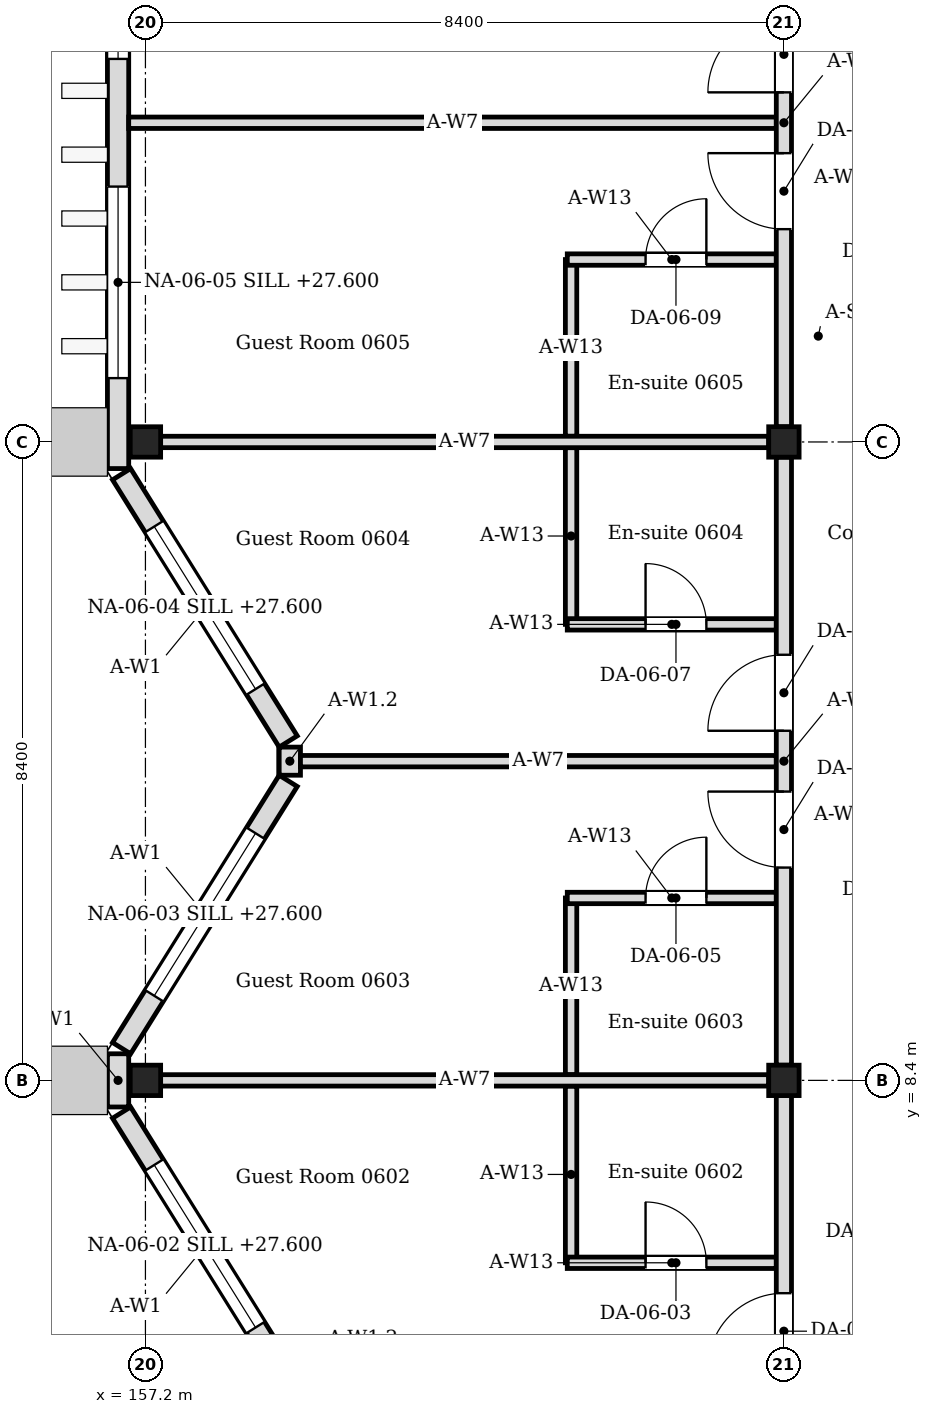
"""IFC4 building model, lengths in metres.
Left out: names, types, materials, properties, quantities, classifications, styles, units other than length and angle.
Written with IfcOpenShell. Run it as: python <this file> out.ifc"""

import sys

from ifc_helpers import new_model, si_unit, direction, frame, frame_2d, origin, origin_2d, place, context, subcontext, project, spatial, rectangle, i_section, extrude, element, fill, save


model = new_model("IFC4")
c1 = context("Model", 3, precision=1e-05, world=origin(), true_north=direction((0.0, 1.0)))
c2 = subcontext(c1, "Body", "Model", "MODEL_VIEW")
j1 = project(units=[si_unit("LENGTHUNIT", "METRE"), si_unit("PLANEANGLEUNIT", "RADIAN")], contexts=[c1])
p1 = place(None, origin())
s1 = spatial("IfcSite", under=j1, at=p1, CompositionType="ELEMENT")
p2 = place(p1, origin())
s2 = spatial("IfcBuilding", under=s1, at=p2, CompositionType="ELEMENT")
p3 = place(p2, frame((0.0, 0.0, 27.0)))
s3 = spatial("IfcBuildingStorey", under=s2, at=p3, CompositionType="ELEMENT", Elevation=27.0)
for number, where, z_axis, x_axis in (
    (1, (157.2, 8.4, 0.0), (0.0, 0.0, 1.0), (1.0, 0.0, 0.0)),
    (2, (157.2, 16.8, 0.0), (0.0, 0.0, 1.0), (1.0, 0.0, 0.0)),
    (3, (165.6, 8.4, 0.0), (0.0, 0.0, 1.0), (1.0, 0.0, 0.0)),
    (4, (165.6, 16.8, 0.0), (0.0, 0.0, 1.0), (1.0, 0.0, 0.0)),
):
    element("IfcColumn", number, at=place(p3, frame(where, z_axis=z_axis, x_axis=x_axis)), inside=s3, PredefinedType="COLUMN", context=c2, shape_type="SweptSolid", body=[
        extrude(i_section(OverallWidth=0.4, OverallDepth=0.4, WebThickness=0.013, FlangeThickness=0.021, FilletRadius=0.022, at=origin_2d()), origin(), (0.0, 0.0, 1.0), 4.2),
    ])
p4 = place(p3, frame((159.079, 4.459, 0.0), z_axis=(0.0, 0.0, 1.0), x_axis=(-0.529018946142, 0.848610013271, 0.0)))
e5 = element("IfcWall", 5, at=p4, inside=s3, PredefinedType="SOLIDWALL", context=c2, shape_type="SweptSolid", body=[
    extrude(rectangle(XDim=4.144, YDim=0.28, at=frame_2d((2.072, 0.0))), origin(), (0.0, 0.0, 1.0), 4.05),
])
p5 = place(p4, frame((0.812, 0.0, 0.6)))
e6 = element("IfcOpeningElement", 6, at=p5, cuts=e5, PredefinedType="OPENING", context=c2, shape_type="SweptSolid", body=[
    extrude(rectangle(XDim=2.52, YDim=2.4, at=frame_2d((1.26, 1.2))), frame((0.0, 0.15, 0.0), z_axis=(0.0, -1.0, 0.0), x_axis=(1.0, 0.0, 0.0)), (0.0, 0.0, 1.0), 0.3),
])
p6 = place(p3, frame((156.84, 8.05, 0.0), z_axis=(0.0, 0.0, 1.0), x_axis=(0.0, 1.0, 0.0)))
e7 = element("IfcWall", 7, at=p6, inside=s3, PredefinedType="SOLIDWALL", context=c2, shape_type="SweptSolid", body=[
    extrude(rectangle(XDim=0.7, YDim=0.28, at=frame_2d((0.35, 0.0))), origin(), (0.0, 0.0, 1.0), 4.05),
])
p7 = place(p3, frame((156.886, 8.824, 0.0), z_axis=(0.0, 0.0, 1.0), x_axis=(0.529018946142, 0.848610013271, 0.0)))
e8 = element("IfcWall", 8, at=p7, inside=s3, PredefinedType="SOLIDWALL", context=c2, shape_type="SweptSolid", body=[
    extrude(rectangle(XDim=4.144, YDim=0.28, at=frame_2d((2.072, 0.0))), origin(), (0.0, 0.0, 1.0), 4.05),
])
p8 = place(p7, frame((0.812, 0.0, 0.6)))
e9 = element("IfcOpeningElement", 9, at=p8, cuts=e8, PredefinedType="OPENING", context=c2, shape_type="SweptSolid", body=[
    extrude(rectangle(XDim=2.52, YDim=2.4, at=frame_2d((1.26, 1.2))), frame((0.0, 0.15, 0.0), z_axis=(0.0, -1.0, 0.0), x_axis=(1.0, 0.0, 0.0)), (0.0, 0.0, 1.0), 0.3),
])
p9 = place(p3, frame((159.079, 12.859, 0.0), z_axis=(0.0, 0.0, 1.0), x_axis=(-0.528992500338, 0.848626498871, 0.0)))
e10 = element("IfcWall", 10, at=p9, inside=s3, PredefinedType="SOLIDWALL", context=c2, shape_type="SweptSolid", body=[
    extrude(rectangle(XDim=4.145, YDim=0.28, at=frame_2d((2.072, 0.0))), origin(), (0.0, 0.0, 1.0), 4.05),
])
p10 = place(p9, frame((0.812, 0.0, 0.6)))
e11 = element("IfcOpeningElement", 11, at=p10, cuts=e10, PredefinedType="OPENING", context=c2, shape_type="SweptSolid", body=[
    extrude(rectangle(XDim=2.52, YDim=2.4, at=frame_2d((1.26, 1.2))), frame((0.0, 0.15, 0.0), z_axis=(0.0, -1.0, 0.0), x_axis=(1.0, 0.0, 0.0)), (0.0, 0.0, 1.0), 0.3),
])
p11 = place(p3, frame((159.1, 12.415, 0.0), z_axis=(0.0, 0.0, 1.0), x_axis=(0.0, 1.0, 0.0)))
e12 = element("IfcWall", 12, at=p11, inside=s3, PredefinedType="SOLIDWALL", context=c2, shape_type="SweptSolid", body=[
    extrude(rectangle(XDim=0.37, YDim=0.28, at=frame_2d((0.185, 0.0))), origin(), (0.0, 0.0, 1.0), 3.604),
])
p12 = place(p3, frame((156.84, 16.45, 0.0), z_axis=(0.0, 0.0, 1.0), x_axis=(0.0, 1.0, 0.0)))
e13 = element("IfcWall", 13, at=p12, inside=s3, PredefinedType="SOLIDWALL", context=c2, shape_type="SweptSolid", body=[
    extrude(rectangle(XDim=25.9, YDim=0.28, at=frame_2d((12.95, 0.0))), origin(), (0.0, 0.0, 1.0), 4.05),
])
p13 = place(p12, frame((1.19, 0.0, 0.6)))
e14 = element("IfcOpeningElement", 14, at=p13, cuts=e13, PredefinedType="OPENING", context=c2, shape_type="SweptSolid", body=[
    extrude(rectangle(XDim=2.52, YDim=2.4, at=frame_2d((1.26, 1.2))), frame((0.0, 0.15, 0.0), z_axis=(0.0, -1.0, 0.0), x_axis=(1.0, 0.0, 0.0)), (0.0, 0.0, 1.0), 0.3),
])
p14 = place(p12, frame((5.39, 0.0, 0.6)))
e15 = element("IfcOpeningElement", 15, at=p14, cuts=e13, PredefinedType="OPENING", context=c2, shape_type="SweptSolid", body=[
    extrude(rectangle(XDim=2.52, YDim=2.4, at=frame_2d((1.26, 1.2))), frame((0.0, 0.15, 0.0), z_axis=(0.0, -1.0, 0.0), x_axis=(1.0, 0.0, 0.0)), (0.0, 0.0, 1.0), 0.3),
])
p15 = place(p12, frame((10.01, 0.0, 0.6)))
e16 = element("IfcOpeningElement", 16, at=p15, cuts=e13, PredefinedType="OPENING", context=c2, shape_type="SweptSolid", body=[
    extrude(rectangle(XDim=2.52, YDim=2.4, at=frame_2d((1.26, 1.2))), frame((0.0, 0.15, 0.0), z_axis=(0.0, -1.0, 0.0), x_axis=(1.0, 0.0, 0.0)), (0.0, 0.0, 1.0), 0.3),
])
p16 = place(p12, frame((14.21, 0.0, 0.6)))
e17 = element("IfcOpeningElement", 17, at=p16, cuts=e13, PredefinedType="OPENING", context=c2, shape_type="SweptSolid", body=[
    extrude(rectangle(XDim=2.52, YDim=2.4, at=frame_2d((1.26, 1.2))), frame((0.0, 0.15, 0.0), z_axis=(0.0, -1.0, 0.0), x_axis=(1.0, 0.0, 0.0)), (0.0, 0.0, 1.0), 0.3),
])
p17 = place(p12, frame((17.99, 0.0, 0.6)))
e18 = element("IfcOpeningElement", 18, at=p17, cuts=e13, PredefinedType="OPENING", context=c2, shape_type="SweptSolid", body=[
    extrude(rectangle(XDim=2.52, YDim=2.4, at=frame_2d((1.26, 1.2))), frame((0.0, 0.15, 0.0), z_axis=(0.0, -1.0, 0.0), x_axis=(1.0, 0.0, 0.0)), (0.0, 0.0, 1.0), 0.3),
])
p18 = place(p12, frame((22.19, 0.0, 0.6)))
e19 = element("IfcOpeningElement", 19, at=p18, cuts=e13, PredefinedType="OPENING", context=c2, shape_type="SweptSolid", body=[
    extrude(rectangle(XDim=2.52, YDim=2.4, at=frame_2d((1.26, 1.2))), frame((0.0, 0.15, 0.0), z_axis=(0.0, -1.0, 0.0), x_axis=(1.0, 0.0, 0.0)), (0.0, 0.0, 1.0), 0.3),
])
p19 = place(p3, frame((162.8, 6.0, 0.0), z_axis=(0.0, 0.0, 1.0), x_axis=(0.0, 1.0, 0.0)))
e20 = element("IfcWall", 20, at=p19, inside=s3, PredefinedType="PARTITIONING", context=c2, shape_type="SweptSolid", body=[
    extrude(rectangle(XDim=2.325, YDim=0.15, at=frame_2d((1.163, 0.0))), origin(), (0.0, 0.0, 1.0), 4.05),
])
p20 = place(p3, frame((162.75, 6.0, 0.0), z_axis=(0.0, 0.0, 1.0), x_axis=(1.0, 0.0, 0.0)))
e21 = element("IfcWall", 21, at=p20, inside=s3, PredefinedType="PARTITIONING", context=c2, shape_type="SweptSolid", body=[
    extrude(rectangle(XDim=2.75, YDim=0.15, at=frame_2d((1.375, 0.0))), origin(), (0.0, 0.0, 1.0), 4.05),
])
p21 = place(p20, frame((1.03, 0.0, 0.0)))
e22 = element("IfcOpeningElement", 22, at=p21, cuts=e21, PredefinedType="OPENING", context=c2, shape_type="SweptSolid", body=[
    extrude(rectangle(XDim=0.8, YDim=2.1, at=frame_2d((0.4, 1.05))), frame((0.0, 0.085, 0.0), z_axis=(0.0, -1.0, 0.0), x_axis=(1.0, 0.0, 0.0)), (0.0, 0.0, 1.0), 0.17),
])
p22 = place(p3, frame((162.8, 8.475, 0.0), z_axis=(0.0, 0.0, 1.0), x_axis=(0.0, 1.0, 0.0)))
e23 = element("IfcWall", 23, at=p22, inside=s3, PredefinedType="PARTITIONING", context=c2, shape_type="SweptSolid", body=[
    extrude(rectangle(XDim=2.325, YDim=0.15, at=frame_2d((1.163, 0.0))), origin(), (0.0, 0.0, 1.0), 4.05),
])
p23 = place(p3, frame((162.75, 10.8, 0.0), z_axis=(0.0, 0.0, 1.0), x_axis=(1.0, 0.0, 0.0)))
e24 = element("IfcWall", 24, at=p23, inside=s3, PredefinedType="PARTITIONING", context=c2, shape_type="SweptSolid", body=[
    extrude(rectangle(XDim=2.75, YDim=0.15, at=frame_2d((1.375, 0.0))), origin(), (0.0, 0.0, 1.0), 4.05),
])
p24 = place(p23, frame((1.03, 0.0, 0.0)))
e25 = element("IfcOpeningElement", 25, at=p24, cuts=e24, PredefinedType="OPENING", context=c2, shape_type="SweptSolid", body=[
    extrude(rectangle(XDim=0.8, YDim=2.1, at=frame_2d((0.4, 1.05))), frame((0.0, 0.085, 0.0), z_axis=(0.0, -1.0, 0.0), x_axis=(1.0, 0.0, 0.0)), (0.0, 0.0, 1.0), 0.17),
])
p25 = place(p3, frame((162.8, 14.4, 0.0), z_axis=(0.0, 0.0, 1.0), x_axis=(0.0, 1.0, 0.0)))
e26 = element("IfcWall", 26, at=p25, inside=s3, PredefinedType="PARTITIONING", context=c2, shape_type="SweptSolid", body=[
    extrude(rectangle(XDim=2.325, YDim=0.15, at=frame_2d((1.163, 0.0))), origin(), (0.0, 0.0, 1.0), 4.05),
])
p26 = place(p3, frame((162.75, 14.4, 0.0), z_axis=(0.0, 0.0, 1.0), x_axis=(1.0, 0.0, 0.0)))
e27 = element("IfcWall", 27, at=p26, inside=s3, PredefinedType="PARTITIONING", context=c2, shape_type="SweptSolid", body=[
    extrude(rectangle(XDim=2.75, YDim=0.15, at=frame_2d((1.375, 0.0))), origin(), (0.0, 0.0, 1.0), 4.05),
])
p27 = place(p26, frame((1.03, 0.0, 0.0)))
e28 = element("IfcOpeningElement", 28, at=p27, cuts=e27, PredefinedType="OPENING", context=c2, shape_type="SweptSolid", body=[
    extrude(rectangle(XDim=0.8, YDim=2.1, at=frame_2d((0.4, 1.05))), frame((0.0, 0.085, 0.0), z_axis=(0.0, -1.0, 0.0), x_axis=(1.0, 0.0, 0.0)), (0.0, 0.0, 1.0), 0.17),
])
p28 = place(p3, frame((162.8, 16.875, 0.0), z_axis=(0.0, 0.0, 1.0), x_axis=(0.0, 1.0, 0.0)))
e29 = element("IfcWall", 29, at=p28, inside=s3, PredefinedType="PARTITIONING", context=c2, shape_type="SweptSolid", body=[
    extrude(rectangle(XDim=2.325, YDim=0.15, at=frame_2d((1.163, 0.0))), origin(), (0.0, 0.0, 1.0), 4.05),
])
p29 = place(p3, frame((162.75, 19.2, 0.0), z_axis=(0.0, 0.0, 1.0), x_axis=(1.0, 0.0, 0.0)))
e30 = element("IfcWall", 30, at=p29, inside=s3, PredefinedType="PARTITIONING", context=c2, shape_type="SweptSolid", body=[
    extrude(rectangle(XDim=2.75, YDim=0.15, at=frame_2d((1.375, 0.0))), origin(), (0.0, 0.0, 1.0), 4.05),
])
p30 = place(p29, frame((1.03, 0.0, 0.0)))
e31 = element("IfcOpeningElement", 31, at=p30, cuts=e30, PredefinedType="OPENING", context=c2, shape_type="SweptSolid", body=[
    extrude(rectangle(XDim=0.8, YDim=2.1, at=frame_2d((0.4, 1.05))), frame((0.0, 0.085, 0.0), z_axis=(0.0, -1.0, 0.0), x_axis=(1.0, 0.0, 0.0)), (0.0, 0.0, 1.0), 0.17),
])
for number, where, z_axis, x_axis in (
    (32, (157.4, 8.4, 0.0), (0.0, 0.0, 1.0), (1.0, 0.0, 0.0)),
    (33, (157.4, 16.8, 0.0), (0.0, 0.0, 1.0), (1.0, 0.0, 0.0)),
):
    element("IfcWall", number, at=place(p3, frame(where, z_axis=z_axis, x_axis=x_axis)), inside=s3, PredefinedType="PARTITIONING", context=c2, shape_type="SweptSolid", body=[
        extrude(rectangle(XDim=8.0, YDim=0.15, at=frame_2d((4.0, 0.0))), origin(), (0.0, 0.0, 1.0), 3.604),
    ])
p31 = place(p3, frame((159.24, 12.6, 0.0), z_axis=(0.0, 0.0, 1.0), x_axis=(1.0, 0.0, 0.0)))
e34 = element("IfcWall", 34, at=p31, inside=s3, PredefinedType="PARTITIONING", context=c2, shape_type="SweptSolid", body=[
    extrude(rectangle(XDim=6.26, YDim=0.15, at=frame_2d((3.13, 0.0))), origin(), (0.0, 0.0, 1.0), 3.604),
])
p32 = place(p3, frame((156.98, 21.0, 0.0), z_axis=(0.0, 0.0, 1.0), x_axis=(1.0, 0.0, 0.0)))
e35 = element("IfcWall", 35, at=p32, inside=s3, PredefinedType="PARTITIONING", context=c2, shape_type="SweptSolid", body=[
    extrude(rectangle(XDim=8.52, YDim=0.15, at=frame_2d((4.26, 0.0))), origin(), (0.0, 0.0, 1.0), 3.604),
])
p33 = place(p3, frame((165.6, 0.2, 0.0), z_axis=(0.0, 0.0, 1.0), x_axis=(0.0, 1.0, 0.0)))
e36 = element("IfcWall", 36, at=p33, inside=s3, PredefinedType="PARTITIONING", context=c2, shape_type="SweptSolid", body=[
    extrude(rectangle(XDim=8.0, YDim=0.2, at=frame_2d((4.0, 0.0))), origin(), (0.0, 0.0, 1.0), 3.45),
])
p34 = place(p33, frame((2.6, 0.0, 0.0)))
e37 = element("IfcOpeningElement", 37, at=p34, cuts=e36, PredefinedType="OPENING", context=c2, shape_type="SweptSolid", body=[
    extrude(rectangle(XDim=1.0, YDim=2.4, at=frame_2d((0.5, 1.2))), frame((0.0, 0.11, 0.0), z_axis=(0.0, -1.0, 0.0), x_axis=(1.0, 0.0, 0.0)), (0.0, 0.0, 1.0), 0.22),
])
p35 = place(p33, frame((4.4, 0.0, 0.0)))
e38 = element("IfcOpeningElement", 38, at=p35, cuts=e36, PredefinedType="OPENING", context=c2, shape_type="SweptSolid", body=[
    extrude(rectangle(XDim=1.0, YDim=2.4, at=frame_2d((0.5, 1.2))), frame((0.0, 0.11, 0.0), z_axis=(0.0, -1.0, 0.0), x_axis=(1.0, 0.0, 0.0)), (0.0, 0.0, 1.0), 0.22),
])
p36 = place(p3, frame((165.6, 8.6, 0.0), z_axis=(0.0, 0.0, 1.0), x_axis=(0.0, 1.0, 0.0)))
e39 = element("IfcWall", 39, at=p36, inside=s3, PredefinedType="PARTITIONING", context=c2, shape_type="SweptSolid", body=[
    extrude(rectangle(XDim=8.0, YDim=0.2, at=frame_2d((4.0, 0.0))), origin(), (0.0, 0.0, 1.0), 3.45),
])
p37 = place(p36, frame((2.6, 0.0, 0.0)))
e40 = element("IfcOpeningElement", 40, at=p37, cuts=e39, PredefinedType="OPENING", context=c2, shape_type="SweptSolid", body=[
    extrude(rectangle(XDim=1.0, YDim=2.4, at=frame_2d((0.5, 1.2))), frame((0.0, 0.11, 0.0), z_axis=(0.0, -1.0, 0.0), x_axis=(1.0, 0.0, 0.0)), (0.0, 0.0, 1.0), 0.22),
])
p38 = place(p36, frame((4.4, 0.0, 0.0)))
e41 = element("IfcOpeningElement", 41, at=p38, cuts=e39, PredefinedType="OPENING", context=c2, shape_type="SweptSolid", body=[
    extrude(rectangle(XDim=1.0, YDim=2.4, at=frame_2d((0.5, 1.2))), frame((0.0, 0.11, 0.0), z_axis=(0.0, -1.0, 0.0), x_axis=(1.0, 0.0, 0.0)), (0.0, 0.0, 1.0), 0.22),
])
p39 = place(p3, frame((165.6, 17.0, 0.0), z_axis=(0.0, 0.0, 1.0), x_axis=(0.0, 1.0, 0.0)))
e42 = element("IfcWall", 42, at=p39, inside=s3, PredefinedType="PARTITIONING", context=c2, shape_type="SweptSolid", body=[
    extrude(rectangle(XDim=8.0, YDim=0.2, at=frame_2d((4.0, 0.0))), origin(), (0.0, 0.0, 1.0), 3.45),
])
p40 = place(p39, frame((2.6, 0.0, 0.0)))
e43 = element("IfcOpeningElement", 43, at=p40, cuts=e42, PredefinedType="OPENING", context=c2, shape_type="SweptSolid", body=[
    extrude(rectangle(XDim=1.0, YDim=2.4, at=frame_2d((0.5, 1.2))), frame((0.0, 0.11, 0.0), z_axis=(0.0, -1.0, 0.0), x_axis=(1.0, 0.0, 0.0)), (0.0, 0.0, 1.0), 0.22),
])
p41 = place(p39, frame((4.4, 0.0, 0.0)))
e44 = element("IfcOpeningElement", 44, at=p41, cuts=e42, PredefinedType="OPENING", context=c2, shape_type="SweptSolid", body=[
    extrude(rectangle(XDim=1.0, YDim=2.4, at=frame_2d((0.5, 1.2))), frame((0.0, 0.11, 0.0), z_axis=(0.0, -1.0, 0.0), x_axis=(1.0, 0.0, 0.0)), (0.0, 0.0, 1.0), 0.22),
])
p42 = place(p5, origin())
e45 = element("IfcWindow", 45, at=p42, inside=s3, PartitioningType="SINGLE_PANEL", PredefinedType="WINDOW", context=c2, shape_type="SweptSolid", body=[
    extrude(rectangle(XDim=2.52, YDim=2.4, at=frame_2d((1.26, 1.2))), frame((0.0, 0.03, 0.0), z_axis=(0.0, -1.0, 0.0), x_axis=(1.0, 0.0, 0.0)), (0.0, 0.0, 1.0), 0.06),
])
fill(e6, e45)
p43 = place(p8, origin())
e46 = element("IfcWindow", 46, at=p43, inside=s3, PartitioningType="SINGLE_PANEL", PredefinedType="WINDOW", context=c2, shape_type="SweptSolid", body=[
    extrude(rectangle(XDim=2.52, YDim=2.4, at=frame_2d((1.26, 1.2))), frame((0.0, 0.03, 0.0), z_axis=(0.0, -1.0, 0.0), x_axis=(1.0, 0.0, 0.0)), (0.0, 0.0, 1.0), 0.06),
])
fill(e9, e46)
p44 = place(p10, origin())
e47 = element("IfcWindow", 47, at=p44, inside=s3, PartitioningType="SINGLE_PANEL", PredefinedType="WINDOW", context=c2, shape_type="SweptSolid", body=[
    extrude(rectangle(XDim=2.52, YDim=2.4, at=frame_2d((1.26, 1.2))), frame((0.0, 0.03, 0.0), z_axis=(0.0, -1.0, 0.0), x_axis=(1.0, 0.0, 0.0)), (0.0, 0.0, 1.0), 0.06),
])
fill(e11, e47)
p45 = place(p13, origin())
e48 = element("IfcWindow", 48, at=p45, inside=s3, PartitioningType="SINGLE_PANEL", PredefinedType="WINDOW", context=c2, shape_type="SweptSolid", body=[
    extrude(rectangle(XDim=2.52, YDim=2.4, at=frame_2d((1.26, 1.2))), frame((0.0, 0.03, 0.0), z_axis=(0.0, -1.0, 0.0), x_axis=(1.0, 0.0, 0.0)), (0.0, 0.0, 1.0), 0.06),
])
fill(e14, e48)
p46 = place(p14, origin())
e49 = element("IfcWindow", 49, at=p46, inside=s3, PartitioningType="SINGLE_PANEL", PredefinedType="WINDOW", context=c2, shape_type="SweptSolid", body=[
    extrude(rectangle(XDim=2.52, YDim=2.4, at=frame_2d((1.26, 1.2))), frame((0.0, 0.03, 0.0), z_axis=(0.0, -1.0, 0.0), x_axis=(1.0, 0.0, 0.0)), (0.0, 0.0, 1.0), 0.06),
])
fill(e15, e49)
p47 = place(p21, origin())
e50 = element("IfcDoor", 50, at=p47, inside=s3, OperationType="SINGLE_SWING_LEFT", PredefinedType="DOOR", context=c2, shape_type="SweptSolid", body=[
    extrude(rectangle(XDim=0.8, YDim=2.1, at=frame_2d((0.4, 1.05))), frame((0.0, 0.025, 0.0), z_axis=(0.0, -1.0, 0.0), x_axis=(1.0, 0.0, 0.0)), (0.0, 0.0, 1.0), 0.05),
])
fill(e22, e50)
p48 = place(p35, origin())
e51 = element("IfcDoor", 51, at=p48, inside=s3, OperationType="SINGLE_SWING_LEFT", PredefinedType="DOOR", context=c2, shape_type="SweptSolid", body=[
    extrude(rectangle(XDim=1.0, YDim=2.4, at=frame_2d((0.5, 1.2))), frame((0.0, 0.025, 0.0), z_axis=(0.0, -1.0, 0.0), x_axis=(1.0, 0.0, 0.0)), (0.0, 0.0, 1.0), 0.05),
])
fill(e38, e51)
p49 = place(p24, origin())
e52 = element("IfcDoor", 52, at=p49, inside=s3, OperationType="SINGLE_SWING_RIGHT", PredefinedType="DOOR", context=c2, shape_type="SweptSolid", body=[
    extrude(rectangle(XDim=0.8, YDim=2.1, at=frame_2d((0.4, 1.05))), frame((0.0, 0.025, 0.0), z_axis=(0.0, -1.0, 0.0), x_axis=(1.0, 0.0, 0.0)), (0.0, 0.0, 1.0), 0.05),
])
fill(e25, e52)
p50 = place(p37, origin())
e53 = element("IfcDoor", 53, at=p50, inside=s3, OperationType="SINGLE_SWING_RIGHT", PredefinedType="DOOR", context=c2, shape_type="SweptSolid", body=[
    extrude(rectangle(XDim=1.0, YDim=2.4, at=frame_2d((0.5, 1.2))), frame((0.0, 0.025, 0.0), z_axis=(0.0, -1.0, 0.0), x_axis=(1.0, 0.0, 0.0)), (0.0, 0.0, 1.0), 0.05),
])
fill(e40, e53)
p51 = place(p27, origin())
e54 = element("IfcDoor", 54, at=p51, inside=s3, OperationType="SINGLE_SWING_LEFT", PredefinedType="DOOR", context=c2, shape_type="SweptSolid", body=[
    extrude(rectangle(XDim=0.8, YDim=2.1, at=frame_2d((0.4, 1.05))), frame((0.0, 0.025, 0.0), z_axis=(0.0, -1.0, 0.0), x_axis=(1.0, 0.0, 0.0)), (0.0, 0.0, 1.0), 0.05),
])
fill(e28, e54)
p52 = place(p38, origin())
e55 = element("IfcDoor", 55, at=p52, inside=s3, OperationType="SINGLE_SWING_LEFT", PredefinedType="DOOR", context=c2, shape_type="SweptSolid", body=[
    extrude(rectangle(XDim=1.0, YDim=2.4, at=frame_2d((0.5, 1.2))), frame((0.0, 0.025, 0.0), z_axis=(0.0, -1.0, 0.0), x_axis=(1.0, 0.0, 0.0)), (0.0, 0.0, 1.0), 0.05),
])
fill(e41, e55)
p53 = place(p30, origin())
e56 = element("IfcDoor", 56, at=p53, inside=s3, OperationType="SINGLE_SWING_RIGHT", PredefinedType="DOOR", context=c2, shape_type="SweptSolid", body=[
    extrude(rectangle(XDim=0.8, YDim=2.1, at=frame_2d((0.4, 1.05))), frame((0.0, 0.025, 0.0), z_axis=(0.0, -1.0, 0.0), x_axis=(1.0, 0.0, 0.0)), (0.0, 0.0, 1.0), 0.05),
])
fill(e31, e56)
p54 = place(p40, origin())
e57 = element("IfcDoor", 57, at=p54, inside=s3, OperationType="SINGLE_SWING_RIGHT", PredefinedType="DOOR", context=c2, shape_type="SweptSolid", body=[
    extrude(rectangle(XDim=1.0, YDim=2.4, at=frame_2d((0.5, 1.2))), frame((0.0, 0.025, 0.0), z_axis=(0.0, -1.0, 0.0), x_axis=(1.0, 0.0, 0.0)), (0.0, 0.0, 1.0), 0.05),
])
fill(e43, e57)
p55 = place(p41, origin())
e58 = element("IfcDoor", 58, at=p55, inside=s3, OperationType="SINGLE_SWING_LEFT", PredefinedType="DOOR", context=c2, shape_type="SweptSolid", body=[
    extrude(rectangle(XDim=1.0, YDim=2.4, at=frame_2d((0.5, 1.2))), frame((0.0, 0.025, 0.0), z_axis=(0.0, -1.0, 0.0), x_axis=(1.0, 0.0, 0.0)), (0.0, 0.0, 1.0), 0.05),
])
fill(e44, e58)
save(model, sys.argv[1])
